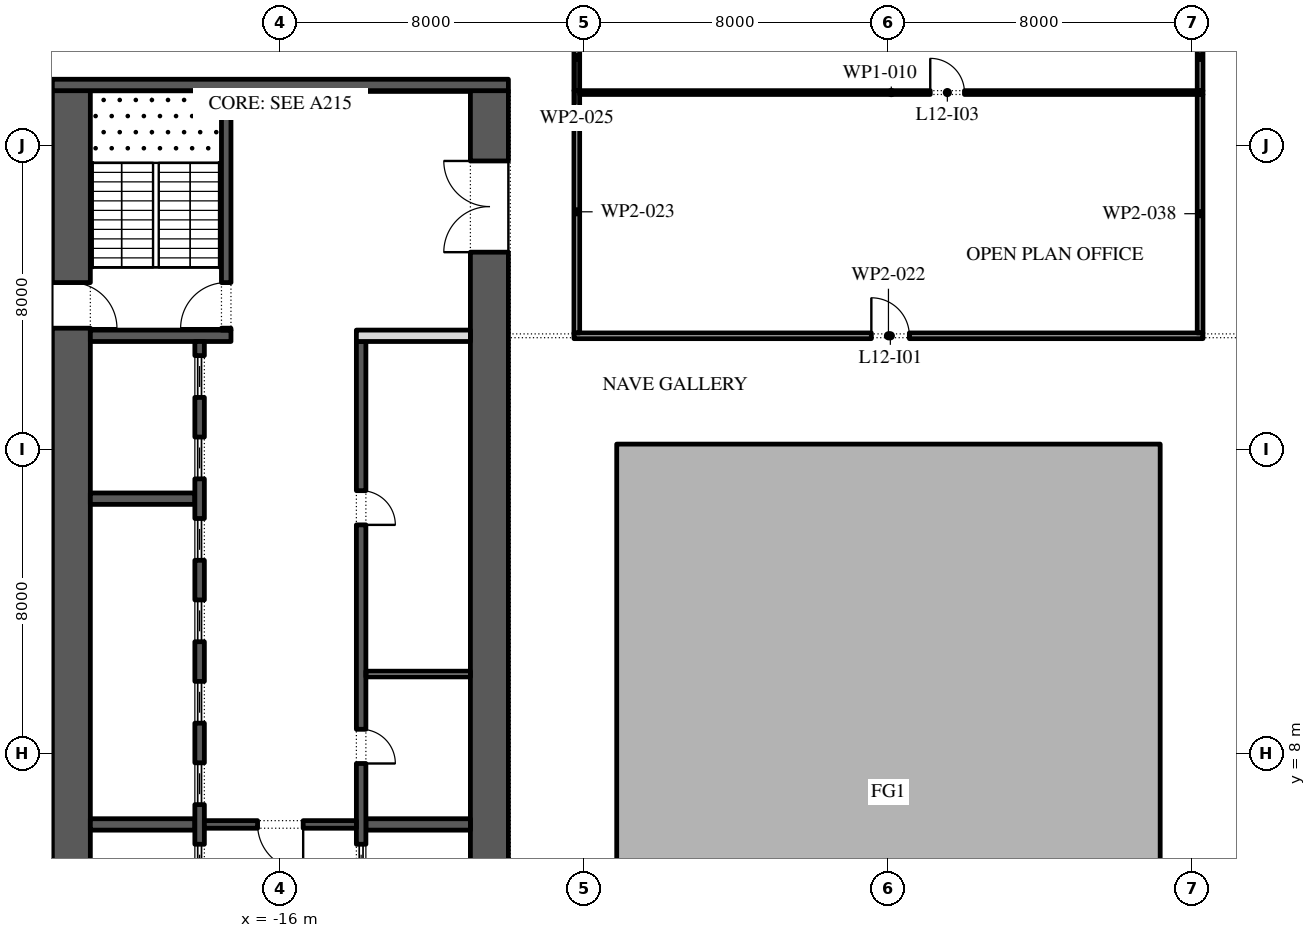
"""IFC4 building model, lengths in metres.
Left out: names, types, materials, properties, quantities, classifications, styles, units other than length and angle.
Written with IfcOpenShell. Run it as: python <this file> out.ifc"""

import sys

from ifc_helpers import new_model, si_unit, direction, frame, frame_2d, origin, place, context, subcontext, project, spatial, polyline, rectangle, outline, extrude, element, fill, save


model = new_model("IFC4")
c1 = context("Model", 3, precision=1e-05, world=origin(), true_north=direction((0.0, 1.0)))
c2 = subcontext(c1, "Body", "Model", "MODEL_VIEW")
j1 = project(units=[si_unit("LENGTHUNIT", "METRE"), si_unit("PLANEANGLEUNIT", "RADIAN")], contexts=[c1])
p1 = place(None, origin())
s1 = spatial("IfcSite", under=j1, at=p1, CompositionType="ELEMENT")
p2 = place(p1, origin())
s2 = spatial("IfcBuilding", under=s1, at=p2, CompositionType="ELEMENT")
p3 = place(p2, frame((0.0, 0.0, 60.6)))
s3 = spatial("IfcBuildingStorey", under=s2, at=p3, CompositionType="ELEMENT", Elevation=60.6)
p4 = place(p3, origin())
e1 = element("IfcWall", 1, at=p4, inside=s3, PredefinedType="STANDARD", context=c2, shape_type="SweptSolid", body=[
    extrude(outline(polyline([(-7.15, -2.15), (7.15, -2.15), (7.15, 16.15), (-7.15, 16.15), (-7.15, -2.15)]), holes=[polyline([(-7.0, -2.0), (-7.0, 16.0), (7.0, 16.0), (7.0, -2.0), (-7.0, -2.0)])]), origin(), (0.0, 0.0, 1.0), 4.0),
])
p5 = place(p3, frame((-21.5, -2.45, 0.0), z_axis=(0.0, 0.0, 1.0), x_axis=(0.0, 1.0, 0.0)))
e2 = element("IfcWall", 2, at=p5, inside=s3, PredefinedType="SHEAR", context=c2, shape_type="SweptSolid", body=[
    extrude(rectangle(XDim=27.9, YDim=1.0, at=frame_2d((13.95, 0.0))), origin(), (0.0, 0.0, 1.0), 4.0),
])
p6 = place(p5, frame((5.05, 0.0, 0.0)))
e3 = element("IfcOpeningElement", 3, at=p6, cuts=e2, PredefinedType="OPENING", context=c2, shape_type="SweptSolid", body=[
    extrude(rectangle(XDim=1.2, YDim=2.1, at=frame_2d((0.6, 1.05))), frame((0.0, 0.51, 0.0), z_axis=(0.0, -1.0, 0.0), x_axis=(1.0, 0.0, 0.0)), (0.0, 0.0, 1.0), 1.02),
])
p7 = place(p5, frame((21.65, 0.0, 0.0)))
e4 = element("IfcOpeningElement", 4, at=p7, cuts=e2, PredefinedType="OPENING", context=c2, shape_type="SweptSolid", body=[
    extrude(rectangle(XDim=1.2, YDim=2.1, at=frame_2d((0.6, 1.05))), frame((0.0, 0.51, 0.0), z_axis=(0.0, -1.0, 0.0), x_axis=(1.0, 0.0, 0.0)), (0.0, 0.0, 1.0), 1.02),
])
p8 = place(p3, frame((-10.5, -2.45, 0.0), z_axis=(0.0, 0.0, 1.0), x_axis=(0.0, 1.0, 0.0)))
e5 = element("IfcWall", 5, at=p8, inside=s3, PredefinedType="SHEAR", context=c2, shape_type="SweptSolid", body=[
    extrude(rectangle(XDim=27.9, YDim=1.0, at=frame_2d((13.95, 0.0))), origin(), (0.0, 0.0, 1.0), 4.0),
])
p9 = place(p8, frame((23.65, 0.0, 0.0)))
e6 = element("IfcOpeningElement", 6, at=p9, cuts=e5, PredefinedType="OPENING", context=c2, shape_type="SweptSolid", body=[
    extrude(rectangle(XDim=2.4, YDim=2.1, at=frame_2d((1.2, 1.05))), frame((0.0, 0.51, 0.0), z_axis=(0.0, -1.0, 0.0), x_axis=(1.0, 0.0, 0.0)), (0.0, 0.0, 1.0), 1.02),
])
p10 = place(p8, frame((2.7, 0.0, 0.0)))
e7 = element("IfcOpeningElement", 7, at=p10, cuts=e5, PredefinedType="OPENING", context=c2, shape_type="SweptSolid", body=[
    extrude(rectangle(XDim=0.9, YDim=2.1, at=frame_2d((0.45, 1.05))), frame((0.0, 0.51, 0.0), z_axis=(0.0, -1.0, 0.0), x_axis=(1.0, 0.0, 0.0)), (0.0, 0.0, 1.0), 1.02),
])
p11 = place(p3, frame((-22.0, 25.6, 0.0), z_axis=(0.0, 0.0, 1.0), x_axis=(1.0, 0.0, 0.0)))
e8 = element("IfcWall", 8, at=p11, inside=s3, PredefinedType="SHEAR", context=c2, shape_type="SweptSolid", body=[
    extrude(rectangle(XDim=12.0, YDim=0.3, at=frame_2d((6.0, 0.0))), origin(), (0.0, 0.0, 1.0), 4.0),
])
p12 = place(p3, frame((-21.0, 19.0, 0.0), z_axis=(0.0, 0.0, 1.0), x_axis=(1.0, 0.0, 0.0)))
e9 = element("IfcWall", 9, at=p12, inside=s3, PredefinedType="SHEAR", context=c2, shape_type="SweptSolid", body=[
    extrude(rectangle(XDim=3.7, YDim=0.3, at=frame_2d((1.85, 0.0))), origin(), (0.0, 0.0, 1.0), 4.0),
])
p13 = place(p3, frame((-17.425, 19.15, 0.0), z_axis=(0.0, 0.0, 1.0), x_axis=(0.0, 1.0, 0.0)))
e10 = element("IfcWall", 10, at=p13, inside=s3, PredefinedType="SHEAR", context=c2, shape_type="SweptSolid", body=[
    extrude(rectangle(XDim=6.3, YDim=0.25, at=frame_2d((3.15, 0.0))), origin(), (0.0, 0.0, 1.0), 4.0),
])
p14 = place(p13, frame((0.05, 0.0, 0.0)))
e11 = element("IfcOpeningElement", 11, at=p14, cuts=e10, PredefinedType="OPENING", context=c2, shape_type="SweptSolid", body=[
    extrude(rectangle(XDim=1.2, YDim=2.1, at=frame_2d((0.6, 1.05))), frame((0.0, 0.135, 0.0), z_axis=(0.0, -1.0, 0.0), x_axis=(1.0, 0.0, 0.0)), (0.0, 0.0, 1.0), 0.27),
])
for number, where, z_axis, x_axis in (
    (12, (-21.0, 6.143, 0.0), (0.0, 0.0, 1.0), (1.0, 0.0, 0.0)),
    (13, (-21.0, 14.714, 0.0), (0.0, 0.0, 1.0), (1.0, 0.0, 0.0)),
):
    element("IfcWall", number, at=place(p3, frame(where, z_axis=z_axis, x_axis=x_axis)), inside=s3, PredefinedType="SHEAR", context=c2, shape_type="SweptSolid", body=[
        extrude(rectangle(XDim=2.75, YDim=0.3, at=frame_2d((1.375, 0.0))), origin(), (0.0, 0.0, 1.0), 4.0),
    ])
p15 = place(p3, frame((-18.125, 4.15, 0.0), z_axis=(0.0, 0.0, 1.0), x_axis=(0.0, 1.0, 0.0)))
e14 = element("IfcWall", 14, at=p15, inside=s3, PredefinedType="SHEAR", context=c2, shape_type="SweptSolid", body=[
    extrude(rectangle(XDim=14.7, YDim=0.25, at=frame_2d((7.35, 0.0))), origin(), (0.0, 0.0, 1.0), 4.0),
])
p16 = place(p15, frame((0.371, 0.0, 0.0)))
e15 = element("IfcOpeningElement", 15, at=p16, cuts=e14, PredefinedType="OPENING", context=c2, shape_type="SweptSolid", body=[
    extrude(rectangle(XDim=1.1, YDim=2.1, at=frame_2d((0.55, 1.05))), frame((0.0, 0.135, 0.0), z_axis=(0.0, -1.0, 0.0), x_axis=(1.0, 0.0, 0.0)), (0.0, 0.0, 1.0), 0.27),
])
p17 = place(p15, frame((2.514, 0.0, 0.0)))
e16 = element("IfcOpeningElement", 16, at=p17, cuts=e14, PredefinedType="OPENING", context=c2, shape_type="SweptSolid", body=[
    extrude(rectangle(XDim=1.1, YDim=2.1, at=frame_2d((0.55, 1.05))), frame((0.0, 0.135, 0.0), z_axis=(0.0, -1.0, 0.0), x_axis=(1.0, 0.0, 0.0)), (0.0, 0.0, 1.0), 0.27),
])
p18 = place(p15, frame((4.657, 0.0, 0.0)))
e17 = element("IfcOpeningElement", 17, at=p18, cuts=e14, PredefinedType="OPENING", context=c2, shape_type="SweptSolid", body=[
    extrude(rectangle(XDim=1.1, YDim=2.1, at=frame_2d((0.55, 1.05))), frame((0.0, 0.135, 0.0), z_axis=(0.0, -1.0, 0.0), x_axis=(1.0, 0.0, 0.0)), (0.0, 0.0, 1.0), 0.27),
])
p19 = place(p15, frame((6.8, 0.0, 0.0)))
e18 = element("IfcOpeningElement", 18, at=p19, cuts=e14, PredefinedType="OPENING", context=c2, shape_type="SweptSolid", body=[
    extrude(rectangle(XDim=1.1, YDim=2.1, at=frame_2d((0.55, 1.05))), frame((0.0, 0.135, 0.0), z_axis=(0.0, -1.0, 0.0), x_axis=(1.0, 0.0, 0.0)), (0.0, 0.0, 1.0), 0.27),
])
p20 = place(p15, frame((8.943, 0.0, 0.0)))
e19 = element("IfcOpeningElement", 19, at=p20, cuts=e14, PredefinedType="OPENING", context=c2, shape_type="SweptSolid", body=[
    extrude(rectangle(XDim=1.1, YDim=2.1, at=frame_2d((0.55, 1.05))), frame((0.0, 0.135, 0.0), z_axis=(0.0, -1.0, 0.0), x_axis=(1.0, 0.0, 0.0)), (0.0, 0.0, 1.0), 0.27),
])
p21 = place(p15, frame((11.086, 0.0, 0.0)))
e20 = element("IfcOpeningElement", 20, at=p21, cuts=e14, PredefinedType="OPENING", context=c2, shape_type="SweptSolid", body=[
    extrude(rectangle(XDim=1.1, YDim=2.1, at=frame_2d((0.55, 1.05))), frame((0.0, 0.135, 0.0), z_axis=(0.0, -1.0, 0.0), x_axis=(1.0, 0.0, 0.0)), (0.0, 0.0, 1.0), 0.27),
])
p22 = place(p15, frame((13.229, 0.0, 0.0)))
e21 = element("IfcOpeningElement", 21, at=p22, cuts=e14, PredefinedType="OPENING", context=c2, shape_type="SweptSolid", body=[
    extrude(rectangle(XDim=1.1, YDim=2.1, at=frame_2d((0.55, 1.05))), frame((0.0, 0.135, 0.0), z_axis=(0.0, -1.0, 0.0), x_axis=(1.0, 0.0, 0.0)), (0.0, 0.0, 1.0), 0.27),
])
p23 = place(p3, frame((-13.75, 6.143, 0.0), z_axis=(0.0, 0.0, 1.0), x_axis=(1.0, 0.0, 0.0)))
e22 = element("IfcWall", 22, at=p23, inside=s3, PredefinedType="SHEAR", context=c2, shape_type="SweptSolid", body=[
    extrude(rectangle(XDim=2.75, YDim=0.3, at=frame_2d((1.375, 0.0))), origin(), (0.0, 0.0, 1.0), 4.0),
])
p24 = place(p3, frame((-13.875, -2.45, 0.0), z_axis=(0.0, 0.0, 1.0), x_axis=(0.0, 1.0, 0.0)))
e23 = element("IfcWall", 23, at=p24, inside=s3, PredefinedType="SHEAR", context=c2, shape_type="SweptSolid", body=[
    extrude(rectangle(XDim=21.3, YDim=0.25, at=frame_2d((10.65, 0.0))), origin(), (0.0, 0.0, 1.0), 4.0),
])
p25 = place(p24, frame((10.196, 0.0, 0.0)))
e24 = element("IfcOpeningElement", 24, at=p25, cuts=e23, PredefinedType="OPENING", context=c2, shape_type="SweptSolid", body=[
    extrude(rectangle(XDim=0.9, YDim=2.1, at=frame_2d((0.45, 1.05))), frame((0.0, 0.135, 0.0), z_axis=(0.0, -1.0, 0.0), x_axis=(1.0, 0.0, 0.0)), (0.0, 0.0, 1.0), 0.27),
])
p26 = place(p24, frame((16.475, 0.0, 0.0)))
e25 = element("IfcOpeningElement", 25, at=p26, cuts=e23, PredefinedType="OPENING", context=c2, shape_type="SweptSolid", body=[
    extrude(rectangle(XDim=0.9, YDim=2.1, at=frame_2d((0.45, 1.05))), frame((0.0, 0.135, 0.0), z_axis=(0.0, -1.0, 0.0), x_axis=(1.0, 0.0, 0.0)), (0.0, 0.0, 1.0), 0.27),
])
p27 = place(p24, frame((6.971, 0.0, 0.0)))
e26 = element("IfcOpeningElement", 26, at=p27, cuts=e23, PredefinedType="OPENING", context=c2, shape_type="SweptSolid", body=[
    extrude(rectangle(XDim=1.1, YDim=2.1, at=frame_2d((0.55, 1.05))), frame((0.0, 0.135, 0.0), z_axis=(0.0, -1.0, 0.0), x_axis=(1.0, 0.0, 0.0)), (0.0, 0.0, 1.0), 0.27),
])
p28 = place(p3, frame((-14.0, 19.0, 0.0), z_axis=(0.0, 0.0, 1.0), x_axis=(1.0, 0.0, 0.0)))
e27 = element("IfcWall", 27, at=p28, inside=s3, PredefinedType="PARTITIONING", context=c2, shape_type="SweptSolid", body=[
    extrude(rectangle(XDim=3.0, YDim=0.3, at=frame_2d((1.5, 0.0))), origin(), (0.0, 0.0, 1.0), 4.0),
])
p29 = place(p3, frame((-13.75, 10.1, 0.0), z_axis=(0.0, 0.0, 1.0), x_axis=(1.0, 0.0, 0.0)))
e28 = element("IfcWall", 28, at=p29, inside=s3, PredefinedType="PARTITIONING", context=c2, shape_type="SweptSolid", body=[
    extrude(rectangle(XDim=2.75, YDim=0.15, at=frame_2d((1.375, 0.0))), origin(), (0.0, 0.0, 1.0), 4.0),
])
p30 = place(p3, frame((-18.0, 6.143, 0.0), z_axis=(0.0, 0.0, 1.0), x_axis=(1.0, 0.0, 0.0)))
e29 = element("IfcWall", 29, at=p30, inside=s3, PredefinedType="SHEAR", context=c2, shape_type="SweptSolid", body=[
    extrude(rectangle(XDim=4.0, YDim=0.2, at=frame_2d((2.0, 0.0))), origin(), (0.0, 0.0, 1.0), 4.0),
])
p31 = place(p30, frame((1.4, 0.0, 0.0)))
e30 = element("IfcOpeningElement", 30, at=p31, cuts=e29, PredefinedType="OPENING", context=c2, shape_type="SweptSolid", body=[
    extrude(rectangle(XDim=1.2, YDim=2.1, at=frame_2d((0.6, 1.05))), frame((0.0, 0.11, 0.0), z_axis=(0.0, -1.0, 0.0), x_axis=(1.0, 0.0, 0.0)), (0.0, 0.0, 1.0), 0.22),
])
p32 = place(p3, frame((-8.275, 19.0, 0.0), z_axis=(0.0, 0.0, 1.0), x_axis=(1.0, 0.0, 0.0)))
e31 = element("IfcWall", 31, at=p32, inside=s3, PredefinedType="PARTITIONING", context=c2, shape_type="SweptSolid", body=[
    extrude(rectangle(XDim=16.55, YDim=0.15, at=frame_2d((8.275, 0.0))), origin(), (0.0, 0.0, 1.0), 4.0),
])
p33 = place(p32, frame((7.825, 0.0, 0.0)))
e32 = element("IfcOpeningElement", 32, at=p33, cuts=e31, PredefinedType="OPENING", context=c2, shape_type="SweptSolid", body=[
    extrude(rectangle(XDim=1.0, YDim=2.1, at=frame_2d((0.5, 1.05))), frame((0.0, 0.085, 0.0), z_axis=(0.0, -1.0, 0.0), x_axis=(1.0, 0.0, 0.0)), (0.0, 0.0, 1.0), 0.17),
])
p34 = place(p3, frame((-8.2, 25.45, 0.0), z_axis=(0.0, 0.0, 1.0), x_axis=(0.0, -1.0, 0.0)))
e33 = element("IfcWall", 33, at=p34, inside=s3, PredefinedType="PARTITIONING", context=c2, shape_type="SweptSolid", body=[
    extrude(rectangle(XDim=6.375, YDim=0.15, at=frame_2d((3.188, 0.0))), origin(), (0.0, 0.0, 1.0), 4.0),
])
p35 = place(p3, frame((-8.125, 25.4, 0.0), z_axis=(0.0, 0.0, 1.0), x_axis=(1.0, 0.0, 0.0)))
e34 = element("IfcWall", 34, at=p35, inside=s3, PredefinedType="PARTITIONING", context=c2, shape_type="SweptSolid", body=[
    extrude(rectangle(XDim=16.4, YDim=0.1, at=frame_2d((8.2, 0.0))), origin(), (0.0, 0.0, 1.0), 4.0),
])
p36 = place(p35, frame((9.225, 0.0, 0.0)))
e35 = element("IfcOpeningElement", 35, at=p36, cuts=e34, PredefinedType="OPENING", context=c2, shape_type="SweptSolid", body=[
    extrude(rectangle(XDim=0.9, YDim=2.1, at=frame_2d((0.45, 1.05))), frame((0.0, 0.06, 0.0), z_axis=(0.0, -1.0, 0.0), x_axis=(1.0, 0.0, 0.0)), (0.0, 0.0, 1.0), 0.12),
])
p37 = place(p3, frame((-8.2, 27.2, 0.0), z_axis=(0.0, 0.0, 1.0), x_axis=(0.0, -1.0, 0.0)))
e36 = element("IfcWall", 36, at=p37, inside=s3, PredefinedType="PARTITIONING", context=c2, shape_type="SweptSolid", body=[
    extrude(rectangle(XDim=1.75, YDim=0.15, at=frame_2d((0.875, 0.0))), origin(), (0.0, 0.0, 1.0), 4.0),
])
p38 = place(p3, frame((8.2, 19.075, 0.0), z_axis=(0.0, 0.0, 1.0), x_axis=(0.0, 1.0, 0.0)))
e37 = element("IfcWall", 37, at=p38, inside=s3, PredefinedType="PARTITIONING", context=c2, shape_type="SweptSolid", body=[
    extrude(rectangle(XDim=6.275, YDim=0.15, at=frame_2d((3.138, 0.0))), origin(), (0.0, 0.0, 1.0), 4.0),
])
p39 = place(p3, frame((8.2, 25.45, 0.0), z_axis=(0.0, 0.0, 1.0), x_axis=(0.0, 1.0, 0.0)))
e38 = element("IfcWall", 38, at=p39, inside=s3, PredefinedType="PARTITIONING", context=c2, shape_type="SweptSolid", body=[
    extrude(rectangle(XDim=1.75, YDim=0.15, at=frame_2d((0.875, 0.0))), origin(), (0.0, 0.0, 1.0), 4.0),
])
p40 = place(p16, origin())
e39 = element("IfcDoor", 39, at=p40, inside=s3, OperationType="SLIDING_TO_LEFT", PredefinedType="DOOR", context=c2, shape_type="SweptSolid", body=[
    extrude(rectangle(XDim=1.1, YDim=2.1, at=frame_2d((0.55, 1.05))), frame((0.0, 0.025, 0.0), z_axis=(0.0, -1.0, 0.0), x_axis=(1.0, 0.0, 0.0)), (0.0, 0.0, 1.0), 0.05),
])
fill(e15, e39)
p41 = place(p17, origin())
e40 = element("IfcDoor", 40, at=p41, inside=s3, OperationType="SLIDING_TO_LEFT", PredefinedType="DOOR", context=c2, shape_type="SweptSolid", body=[
    extrude(rectangle(XDim=1.1, YDim=2.1, at=frame_2d((0.55, 1.05))), frame((0.0, 0.025, 0.0), z_axis=(0.0, -1.0, 0.0), x_axis=(1.0, 0.0, 0.0)), (0.0, 0.0, 1.0), 0.05),
])
fill(e16, e40)
p42 = place(p18, origin())
e41 = element("IfcDoor", 41, at=p42, inside=s3, OperationType="SLIDING_TO_LEFT", PredefinedType="DOOR", context=c2, shape_type="SweptSolid", body=[
    extrude(rectangle(XDim=1.1, YDim=2.1, at=frame_2d((0.55, 1.05))), frame((0.0, 0.025, 0.0), z_axis=(0.0, -1.0, 0.0), x_axis=(1.0, 0.0, 0.0)), (0.0, 0.0, 1.0), 0.05),
])
fill(e17, e41)
p43 = place(p19, origin())
e42 = element("IfcDoor", 42, at=p43, inside=s3, OperationType="SLIDING_TO_LEFT", PredefinedType="DOOR", context=c2, shape_type="SweptSolid", body=[
    extrude(rectangle(XDim=1.1, YDim=2.1, at=frame_2d((0.55, 1.05))), frame((0.0, 0.025, 0.0), z_axis=(0.0, -1.0, 0.0), x_axis=(1.0, 0.0, 0.0)), (0.0, 0.0, 1.0), 0.05),
])
fill(e18, e42)
p44 = place(p20, origin())
e43 = element("IfcDoor", 43, at=p44, inside=s3, OperationType="SLIDING_TO_LEFT", PredefinedType="DOOR", context=c2, shape_type="SweptSolid", body=[
    extrude(rectangle(XDim=1.1, YDim=2.1, at=frame_2d((0.55, 1.05))), frame((0.0, 0.025, 0.0), z_axis=(0.0, -1.0, 0.0), x_axis=(1.0, 0.0, 0.0)), (0.0, 0.0, 1.0), 0.05),
])
fill(e19, e43)
p45 = place(p21, origin())
e44 = element("IfcDoor", 44, at=p45, inside=s3, OperationType="SLIDING_TO_LEFT", PredefinedType="DOOR", context=c2, shape_type="SweptSolid", body=[
    extrude(rectangle(XDim=1.1, YDim=2.1, at=frame_2d((0.55, 1.05))), frame((0.0, 0.025, 0.0), z_axis=(0.0, -1.0, 0.0), x_axis=(1.0, 0.0, 0.0)), (0.0, 0.0, 1.0), 0.05),
])
fill(e20, e44)
p46 = place(p22, origin())
e45 = element("IfcDoor", 45, at=p46, inside=s3, OperationType="SLIDING_TO_LEFT", PredefinedType="DOOR", context=c2, shape_type="SweptSolid", body=[
    extrude(rectangle(XDim=1.1, YDim=2.1, at=frame_2d((0.55, 1.05))), frame((0.0, 0.025, 0.0), z_axis=(0.0, -1.0, 0.0), x_axis=(1.0, 0.0, 0.0)), (0.0, 0.0, 1.0), 0.05),
])
fill(e21, e45)
p47 = place(p25, frame((0.9, -0.2, 0.0), z_axis=(0.0, 0.0, 1.0), x_axis=(-1.0, 0.0, 0.0)))
e46 = element("IfcDoor", 46, at=p47, inside=s3, OperationType="SINGLE_SWING_LEFT", PredefinedType="DOOR", context=c2, shape_type="SweptSolid", body=[
    extrude(rectangle(XDim=0.9, YDim=2.1, at=frame_2d((0.45, 1.05))), frame((0.0, -0.075, 0.0), z_axis=(0.0, -1.0, 0.0), x_axis=(1.0, 0.0, 0.0)), (0.0, 0.0, 1.0), 0.05),
])
fill(e24, e46)
p48 = place(p26, frame((0.9, -0.2, 0.0), z_axis=(0.0, 0.0, 1.0), x_axis=(-1.0, 0.0, 0.0)))
e47 = element("IfcDoor", 47, at=p48, inside=s3, OperationType="SINGLE_SWING_LEFT", PredefinedType="DOOR", context=c2, shape_type="SweptSolid", body=[
    extrude(rectangle(XDim=0.9, YDim=2.1, at=frame_2d((0.45, 1.05))), frame((0.0, -0.075, 0.0), z_axis=(0.0, -1.0, 0.0), x_axis=(1.0, 0.0, 0.0)), (0.0, 0.0, 1.0), 0.05),
])
fill(e25, e47)
p49 = place(p27, origin())
e48 = element("IfcDoor", 48, at=p49, inside=s3, OperationType="SLIDING_TO_LEFT", PredefinedType="DOOR", context=c2, shape_type="SweptSolid", body=[
    extrude(rectangle(XDim=1.1, YDim=2.1, at=frame_2d((0.55, 1.05))), frame((0.0, 0.025, 0.0), z_axis=(0.0, -1.0, 0.0), x_axis=(1.0, 0.0, 0.0)), (0.0, 0.0, 1.0), 0.05),
])
fill(e26, e48)
p50 = place(p31, frame((1.2, 0.0, 0.0), z_axis=(0.0, 0.0, 1.0), x_axis=(-1.0, 0.0, 0.0)))
e49 = element("IfcDoor", 49, at=p50, inside=s3, OperationType="SINGLE_SWING_RIGHT", PredefinedType="DOOR", context=c2, shape_type="SweptSolid", body=[
    extrude(rectangle(XDim=1.2, YDim=2.1, at=frame_2d((0.6, 1.05))), frame((0.0, 0.025, 0.0), z_axis=(0.0, -1.0, 0.0), x_axis=(1.0, 0.0, 0.0)), (0.0, 0.0, 1.0), 0.05),
])
fill(e30, e49)
p51 = place(p9, origin())
e50 = element("IfcDoor", 50, at=p51, inside=s3, OperationType="DOUBLE_DOOR_SINGLE_SWING", PredefinedType="DOOR", context=c2, shape_type="SweptSolid", body=[
    extrude(rectangle(XDim=2.4, YDim=2.1, at=frame_2d((1.2, 1.05))), frame((0.0, 0.025, 0.0), z_axis=(0.0, -1.0, 0.0), x_axis=(1.0, 0.0, 0.0)), (0.0, 0.0, 1.0), 0.05),
])
fill(e6, e50)
p52 = place(p14, origin())
e51 = element("IfcDoor", 51, at=p52, inside=s3, OperationType="SINGLE_SWING_RIGHT", PredefinedType="DOOR", context=c2, shape_type="SweptSolid", body=[
    extrude(rectangle(XDim=1.2, YDim=2.1, at=frame_2d((0.6, 1.05))), frame((0.0, 0.025, 0.0), z_axis=(0.0, -1.0, 0.0), x_axis=(1.0, 0.0, 0.0)), (0.0, 0.0, 1.0), 0.05),
])
fill(e11, e51)
p53 = place(p7, frame((1.2, 0.0, 0.0), z_axis=(0.0, 0.0, 1.0), x_axis=(-1.0, 0.0, 0.0)))
e52 = element("IfcDoor", 52, at=p53, inside=s3, OperationType="SINGLE_SWING_LEFT", PredefinedType="DOOR", context=c2, shape_type="SweptSolid", body=[
    extrude(rectangle(XDim=1.2, YDim=2.1, at=frame_2d((0.6, 1.05))), frame((0.0, 0.025, 0.0), z_axis=(0.0, -1.0, 0.0), x_axis=(1.0, 0.0, 0.0)), (0.0, 0.0, 1.0), 0.05),
])
fill(e4, e52)
p54 = place(p33, origin())
e53 = element("IfcDoor", 53, at=p54, inside=s3, OperationType="SINGLE_SWING_RIGHT", PredefinedType="DOOR", context=c2, shape_type="SweptSolid", body=[
    extrude(rectangle(XDim=1.0, YDim=2.1, at=frame_2d((0.5, 1.05))), frame((0.0, 0.025, 0.0), z_axis=(0.0, -1.0, 0.0), x_axis=(1.0, 0.0, 0.0)), (0.0, 0.0, 1.0), 0.05),
])
fill(e32, e53)
p55 = place(p36, origin())
e54 = element("IfcDoor", 54, at=p55, inside=s3, OperationType="SINGLE_SWING_RIGHT", PredefinedType="DOOR", context=c2, shape_type="SweptSolid", body=[
    extrude(rectangle(XDim=0.9, YDim=2.1, at=frame_2d((0.45, 1.05))), frame((0.0, 0.025, 0.0), z_axis=(0.0, -1.0, 0.0), x_axis=(1.0, 0.0, 0.0)), (0.0, 0.0, 1.0), 0.05),
])
fill(e35, e54)
save(model, sys.argv[1])
